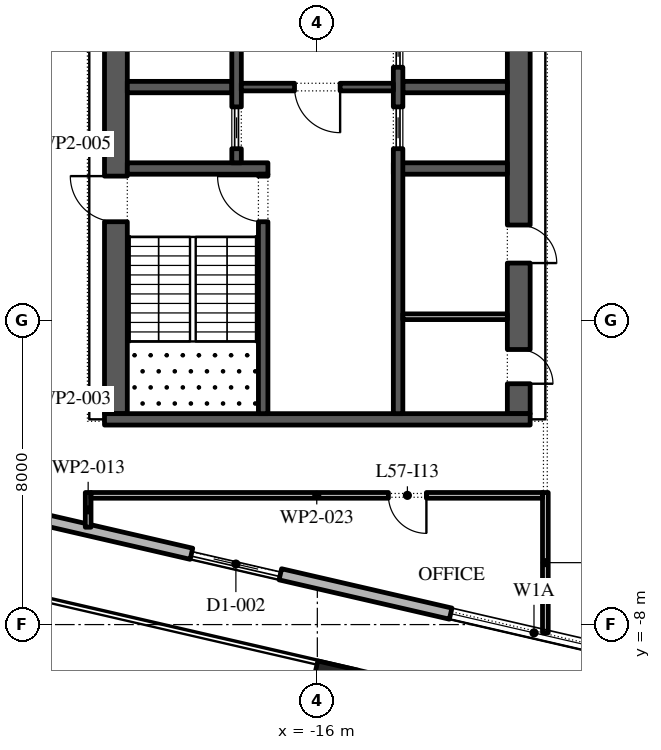
"""IFC4 building model, lengths in metres.
Left out: names, types, materials, properties, quantities, classifications, styles, units other than length and angle.
Written with IfcOpenShell. Run it as: python <this file> out.ifc"""

import sys

from ifc_helpers import new_model, si_unit, direction, frame, frame_2d, origin, origin_2d, place, context, subcontext, project, spatial, rectangle, extrude, element, fill, save


model = new_model("IFC4")
c1 = context("Model", 3, precision=1e-05, world=origin(), true_north=direction((0.0, 1.0)))
c2 = subcontext(c1, "Body", "Model", "MODEL_VIEW")
j1 = project(units=[si_unit("LENGTHUNIT", "METRE"), si_unit("PLANEANGLEUNIT", "RADIAN")], contexts=[c1])
p1 = place(None, origin())
s1 = spatial("IfcSite", under=j1, at=p1, CompositionType="ELEMENT")
p2 = place(p1, origin())
s2 = spatial("IfcBuilding", under=s1, at=p2, CompositionType="ELEMENT")
p3 = place(p2, frame((0.0, 0.0, 264.0)))
s3 = spatial("IfcBuildingStorey", under=s2, at=p3, CompositionType="ELEMENT", Elevation=264.0)
p4 = place(p3, frame((-15.574, -9.617, 0.0), z_axis=(0.0, 0.0, 1.0), x_axis=(0.974370064785, -0.224951054344, 0.0)))
e1 = element("IfcColumn", 1, at=p4, inside=s3, PredefinedType="COLUMN", context=c2, shape_type="SweptSolid", body=[
    extrude(rectangle(XDim=1.1, YDim=1.1, at=origin_2d()), origin(), (0.0, 0.0, 1.0), 4.2),
])
p5 = place(p3, frame((-29.616, -3.758, 0.0), z_axis=(0.0, 0.0, 1.0), x_axis=(0.974370532314, -0.224949029246, 0.0)))
e2 = element("IfcWall", 2, at=p5, inside=s3, PredefinedType="STANDARD", context=c2, shape_type="SweptSolid", body=[
    extrude(rectangle(XDim=48.0, YDim=0.3, at=frame_2d((24.0, 0.0))), origin(), (0.0, 0.0, 1.0), 4.0),
])
p6 = place(p5, frame((1.625, 0.0, 0.45)))
e3 = element("IfcOpeningElement", 3, at=p6, cuts=e2, PredefinedType="OPENING", context=c2, shape_type="SweptSolid", body=[
    extrude(rectangle(XDim=4.5, YDim=3.05, at=frame_2d((2.25, 1.525))), frame((0.0, 0.16, 0.0), z_axis=(0.0, -1.0, 0.0), x_axis=(1.0, 0.0, 0.0)), (0.0, 0.0, 1.0), 0.32),
])
p7 = place(p5, frame((10.575, 0.0, 0.0)))
e4 = element("IfcOpeningElement", 4, at=p7, cuts=e2, PredefinedType="OPENING", context=c2, shape_type="SweptSolid", body=[
    extrude(rectangle(XDim=2.4, YDim=3.5, at=frame_2d((1.2, 1.75))), frame((0.0, 0.16, 0.0), z_axis=(0.0, -1.0, 0.0), x_axis=(1.0, 0.0, 0.0)), (0.0, 0.0, 1.0), 0.32),
])
p8 = place(p5, frame((17.575, 0.0, 0.45)))
e5 = element("IfcOpeningElement", 5, at=p8, cuts=e2, PredefinedType="OPENING", context=c2, shape_type="SweptSolid", body=[
    extrude(rectangle(XDim=4.5, YDim=3.0, at=frame_2d((2.25, 1.5))), frame((0.0, 0.16, 0.0), z_axis=(0.0, -1.0, 0.0), x_axis=(1.0, 0.0, 0.0)), (0.0, 0.0, 1.0), 0.32),
])
p9 = place(p5, frame((25.625, 0.0, 0.45)))
e6 = element("IfcOpeningElement", 6, at=p9, cuts=e2, PredefinedType="OPENING", context=c2, shape_type="SweptSolid", body=[
    extrude(rectangle(XDim=4.5, YDim=2.95, at=frame_2d((2.25, 1.475))), frame((0.0, 0.16, 0.0), z_axis=(0.0, -1.0, 0.0), x_axis=(1.0, 0.0, 0.0)), (0.0, 0.0, 1.0), 0.32),
])
p10 = place(p5, frame((33.675, 0.0, 0.45)))
e7 = element("IfcOpeningElement", 7, at=p10, cuts=e2, PredefinedType="OPENING", context=c2, shape_type="SweptSolid", body=[
    extrude(rectangle(XDim=4.5, YDim=2.825, at=frame_2d((2.25, 1.413))), frame((0.0, 0.16, 0.0), z_axis=(0.0, -1.0, 0.0), x_axis=(1.0, 0.0, 0.0)), (0.0, 0.0, 1.0), 0.32),
])
p11 = place(p5, frame((42.775, 0.0, 0.0)))
e8 = element("IfcOpeningElement", 8, at=p11, cuts=e2, PredefinedType="OPENING", context=c2, shape_type="SweptSolid", body=[
    extrude(rectangle(XDim=2.4, YDim=3.5, at=frame_2d((1.2, 1.75))), frame((0.0, 0.16, 0.0), z_axis=(0.0, -1.0, 0.0), x_axis=(1.0, 0.0, 0.0)), (0.0, 0.0, 1.0), 0.32),
])
p12 = place(p3, frame((-21.359, 48.678, 0.0), z_axis=(0.0, 0.0, 1.0), x_axis=(-0.224949198343, -0.974370493275, 0.0)))
e9 = element("IfcWall", 9, at=p12, inside=s3, PredefinedType="STANDARD", context=c2, shape_type="SweptSolid", body=[
    extrude(rectangle(XDim=49.5, YDim=0.3, at=frame_2d((24.75, 0.0))), origin(), (0.0, 0.0, 1.0), 4.0),
])
p13 = place(p12, frame((1.157, 0.0, 0.45)))
e10 = element("IfcOpeningElement", 10, at=p13, cuts=e9, PredefinedType="OPENING", context=c2, shape_type="SweptSolid", body=[
    extrude(rectangle(XDim=4.5, YDim=3.05, at=frame_2d((2.25, 1.525))), frame((0.0, 0.16, 0.0), z_axis=(0.0, -1.0, 0.0), x_axis=(1.0, 0.0, 0.0)), (0.0, 0.0, 1.0), 0.32),
])
p14 = place(p12, frame((9.171, 0.0, 0.0)))
e11 = element("IfcOpeningElement", 11, at=p14, cuts=e9, PredefinedType="OPENING", context=c2, shape_type="SweptSolid", body=[
    extrude(rectangle(XDim=2.4, YDim=3.5, at=frame_2d((1.2, 1.75))), frame((0.0, 0.16, 0.0), z_axis=(0.0, -1.0, 0.0), x_axis=(1.0, 0.0, 0.0)), (0.0, 0.0, 1.0), 0.32),
])
p15 = place(p12, frame((15.236, 0.0, 0.45)))
e12 = element("IfcOpeningElement", 12, at=p15, cuts=e9, PredefinedType="OPENING", context=c2, shape_type="SweptSolid", body=[
    extrude(rectangle(XDim=4.5, YDim=3.05, at=frame_2d((2.25, 1.525))), frame((0.0, 0.16, 0.0), z_axis=(0.0, -1.0, 0.0), x_axis=(1.0, 0.0, 0.0)), (0.0, 0.0, 1.0), 0.32),
])
p16 = place(p12, frame((22.35, 0.0, 0.45)))
e13 = element("IfcOpeningElement", 13, at=p16, cuts=e9, PredefinedType="OPENING", context=c2, shape_type="SweptSolid", body=[
    extrude(rectangle(XDim=4.5, YDim=3.05, at=frame_2d((2.25, 1.525))), frame((0.0, 0.16, 0.0), z_axis=(0.0, -1.0, 0.0), x_axis=(1.0, 0.0, 0.0)), (0.0, 0.0, 1.0), 0.32),
])
p17 = place(p12, frame((29.464, 0.0, 0.45)))
e14 = element("IfcOpeningElement", 14, at=p17, cuts=e9, PredefinedType="OPENING", context=c2, shape_type="SweptSolid", body=[
    extrude(rectangle(XDim=4.5, YDim=3.05, at=frame_2d((2.25, 1.525))), frame((0.0, 0.16, 0.0), z_axis=(0.0, -1.0, 0.0), x_axis=(1.0, 0.0, 0.0)), (0.0, 0.0, 1.0), 0.32),
])
p18 = place(p12, frame((37.628, 0.0, 0.0)))
e15 = element("IfcOpeningElement", 15, at=p18, cuts=e9, PredefinedType="OPENING", context=c2, shape_type="SweptSolid", body=[
    extrude(rectangle(XDim=2.4, YDim=3.325, at=frame_2d((1.2, 1.663))), frame((0.0, 0.16, 0.0), z_axis=(0.0, -1.0, 0.0), x_axis=(1.0, 0.0, 0.0)), (0.0, 0.0, 1.0), 0.32),
])
p19 = place(p12, frame((43.693, 0.0, 0.45)))
e16 = element("IfcOpeningElement", 16, at=p19, cuts=e9, PredefinedType="OPENING", context=c2, shape_type="SweptSolid", body=[
    extrude(rectangle(XDim=4.5, YDim=2.825, at=frame_2d((2.25, 1.413))), frame((0.0, 0.16, 0.0), z_axis=(0.0, -1.0, 0.0), x_axis=(1.0, 0.0, 0.0)), (0.0, 0.0, 1.0), 0.32),
])
p20 = place(p3, frame((-21.3, -2.45, 0.0), z_axis=(0.0, 0.0, 1.0), x_axis=(0.0, 1.0, 0.0)))
e17 = element("IfcWall", 17, at=p20, inside=s3, PredefinedType="SHEAR", context=c2, shape_type="SweptSolid", body=[
    extrude(rectangle(XDim=27.9, YDim=0.6, at=frame_2d((13.95, 0.0))), origin(), (0.0, 0.0, 1.0), 4.0),
])
p21 = place(p20, frame((5.05, 0.0, 0.0)))
e18 = element("IfcOpeningElement", 18, at=p21, cuts=e17, PredefinedType="OPENING", context=c2, shape_type="SweptSolid", body=[
    extrude(rectangle(XDim=1.2, YDim=2.1, at=frame_2d((0.6, 1.05))), frame((0.0, 0.31, 0.0), z_axis=(0.0, -1.0, 0.0), x_axis=(1.0, 0.0, 0.0)), (0.0, 0.0, 1.0), 0.62),
])
p22 = place(p20, frame((21.65, 0.0, 0.0)))
e19 = element("IfcOpeningElement", 19, at=p22, cuts=e17, PredefinedType="OPENING", context=c2, shape_type="SweptSolid", body=[
    extrude(rectangle(XDim=1.2, YDim=2.1, at=frame_2d((0.6, 1.05))), frame((0.0, 0.31, 0.0), z_axis=(0.0, -1.0, 0.0), x_axis=(1.0, 0.0, 0.0)), (0.0, 0.0, 1.0), 0.62),
])
p23 = place(p3, frame((-10.7, -2.45, 0.0), z_axis=(0.0, 0.0, 1.0), x_axis=(0.0, 1.0, 0.0)))
e20 = element("IfcWall", 20, at=p23, inside=s3, PredefinedType="SHEAR", context=c2, shape_type="SweptSolid", body=[
    extrude(rectangle(XDim=27.9, YDim=0.6, at=frame_2d((13.95, 0.0))), origin(), (0.0, 0.0, 1.0), 4.0),
])
p24 = place(p23, frame((23.65, 0.0, 0.0)))
e21 = element("IfcOpeningElement", 21, at=p24, cuts=e20, PredefinedType="OPENING", context=c2, shape_type="SweptSolid", body=[
    extrude(rectangle(XDim=2.4, YDim=2.1, at=frame_2d((1.2, 1.05))), frame((0.0, 0.31, 0.0), z_axis=(0.0, -1.0, 0.0), x_axis=(1.0, 0.0, 0.0)), (0.0, 0.0, 1.0), 0.62),
])
p25 = place(p23, frame((0.788, 0.0, 0.0)))
e22 = element("IfcOpeningElement", 22, at=p25, cuts=e20, PredefinedType="OPENING", context=c2, shape_type="SweptSolid", body=[
    extrude(rectangle(XDim=0.9, YDim=2.1, at=frame_2d((0.45, 1.05))), frame((0.0, 0.31, 0.0), z_axis=(0.0, -1.0, 0.0), x_axis=(1.0, 0.0, 0.0)), (0.0, 0.0, 1.0), 0.62),
])
p26 = place(p23, frame((3.962, 0.0, 0.0)))
e23 = element("IfcOpeningElement", 23, at=p26, cuts=e20, PredefinedType="OPENING", context=c2, shape_type="SweptSolid", body=[
    extrude(rectangle(XDim=1.0, YDim=2.1, at=frame_2d((0.5, 1.05))), frame((0.0, 0.31, 0.0), z_axis=(0.0, -1.0, 0.0), x_axis=(1.0, 0.0, 0.0)), (0.0, 0.0, 1.0), 0.62),
])
p27 = place(p3, frame((-21.6, -2.6, 0.0), z_axis=(0.0, 0.0, 1.0), x_axis=(1.0, 0.0, 0.0)))
e24 = element("IfcWall", 24, at=p27, inside=s3, PredefinedType="SHEAR", context=c2, shape_type="SweptSolid", body=[
    extrude(rectangle(XDim=11.2, YDim=0.3, at=frame_2d((5.6, 0.0))), origin(), (0.0, 0.0, 1.0), 4.0),
])
p28 = place(p3, frame((-21.0, 4.0, 0.0), z_axis=(0.0, 0.0, 1.0), x_axis=(1.0, 0.0, 0.0)))
e25 = element("IfcWall", 25, at=p28, inside=s3, PredefinedType="SHEAR", context=c2, shape_type="SweptSolid", body=[
    extrude(rectangle(XDim=3.7, YDim=0.3, at=frame_2d((1.85, 0.0))), origin(), (0.0, 0.0, 1.0), 4.0),
])
p29 = place(p3, frame((-17.425, -2.45, 0.0), z_axis=(0.0, 0.0, 1.0), x_axis=(0.0, 1.0, 0.0)))
e26 = element("IfcWall", 26, at=p29, inside=s3, PredefinedType="SHEAR", context=c2, shape_type="SweptSolid", body=[
    extrude(rectangle(XDim=6.3, YDim=0.25, at=frame_2d((3.15, 0.0))), origin(), (0.0, 0.0, 1.0), 4.0),
])
p30 = place(p29, frame((5.05, 0.0, 0.0)))
e27 = element("IfcOpeningElement", 27, at=p30, cuts=e26, PredefinedType="OPENING", context=c2, shape_type="SweptSolid", body=[
    extrude(rectangle(XDim=1.2, YDim=2.1, at=frame_2d((0.6, 1.05))), frame((0.0, 0.135, 0.0), z_axis=(0.0, -1.0, 0.0), x_axis=(1.0, 0.0, 0.0)), (0.0, 0.0, 1.0), 0.27),
])
p31 = place(p3, frame((-21.0, 6.143, 0.0), z_axis=(0.0, 0.0, 1.0), x_axis=(1.0, 0.0, 0.0)))
e28 = element("IfcWall", 28, at=p31, inside=s3, PredefinedType="SHEAR", context=c2, shape_type="SweptSolid", body=[
    extrude(rectangle(XDim=2.75, YDim=0.3, at=frame_2d((1.375, 0.0))), origin(), (0.0, 0.0, 1.0), 4.0),
])
p32 = place(p3, frame((-18.125, 4.15, 0.0), z_axis=(0.0, 0.0, 1.0), x_axis=(0.0, 1.0, 0.0)))
e29 = element("IfcWall", 29, at=p32, inside=s3, PredefinedType="SHEAR", context=c2, shape_type="SweptSolid", body=[
    extrude(rectangle(XDim=14.7, YDim=0.25, at=frame_2d((7.35, 0.0))), origin(), (0.0, 0.0, 1.0), 4.0),
])
p33 = place(p32, frame((4.296, 0.0, 0.0)))
e30 = element("IfcOpeningElement", 30, at=p33, cuts=e29, PredefinedType="OPENING", context=c2, shape_type="SweptSolid", body=[
    extrude(rectangle(XDim=0.9, YDim=2.1, at=frame_2d((0.45, 1.05))), frame((0.0, 0.135, 0.0), z_axis=(0.0, -1.0, 0.0), x_axis=(1.0, 0.0, 0.0)), (0.0, 0.0, 1.0), 0.27),
])
p34 = place(p32, frame((9.504, 0.0, 0.0)))
e31 = element("IfcOpeningElement", 31, at=p34, cuts=e29, PredefinedType="OPENING", context=c2, shape_type="SweptSolid", body=[
    extrude(rectangle(XDim=0.9, YDim=2.1, at=frame_2d((0.45, 1.05))), frame((0.0, 0.135, 0.0), z_axis=(0.0, -1.0, 0.0), x_axis=(1.0, 0.0, 0.0)), (0.0, 0.0, 1.0), 0.27),
])
p35 = place(p32, frame((0.371, 0.0, 0.0)))
e32 = element("IfcOpeningElement", 32, at=p35, cuts=e29, PredefinedType="OPENING", context=c2, shape_type="SweptSolid", body=[
    extrude(rectangle(XDim=1.1, YDim=2.1, at=frame_2d((0.55, 1.05))), frame((0.0, 0.135, 0.0), z_axis=(0.0, -1.0, 0.0), x_axis=(1.0, 0.0, 0.0)), (0.0, 0.0, 1.0), 0.27),
])
p36 = place(p32, frame((13.229, 0.0, 0.0)))
e33 = element("IfcOpeningElement", 33, at=p36, cuts=e29, PredefinedType="OPENING", context=c2, shape_type="SweptSolid", body=[
    extrude(rectangle(XDim=1.1, YDim=2.1, at=frame_2d((0.55, 1.05))), frame((0.0, 0.135, 0.0), z_axis=(0.0, -1.0, 0.0), x_axis=(1.0, 0.0, 0.0)), (0.0, 0.0, 1.0), 0.27),
])
p37 = place(p3, frame((-14.0, 4.0, 0.0), z_axis=(0.0, 0.0, 1.0), x_axis=(1.0, 0.0, 0.0)))
e34 = element("IfcWall", 34, at=p37, inside=s3, PredefinedType="SHEAR", context=c2, shape_type="SweptSolid", body=[
    extrude(rectangle(XDim=3.0, YDim=0.3, at=frame_2d((1.5, 0.0))), origin(), (0.0, 0.0, 1.0), 4.0),
])
p38 = place(p3, frame((-13.75, 6.143, 0.0), z_axis=(0.0, 0.0, 1.0), x_axis=(1.0, 0.0, 0.0)))
e35 = element("IfcWall", 35, at=p38, inside=s3, PredefinedType="SHEAR", context=c2, shape_type="SweptSolid", body=[
    extrude(rectangle(XDim=2.75, YDim=0.3, at=frame_2d((1.375, 0.0))), origin(), (0.0, 0.0, 1.0), 4.0),
])
p39 = place(p3, frame((-13.875, -2.45, 0.0), z_axis=(0.0, 0.0, 1.0), x_axis=(0.0, 1.0, 0.0)))
e36 = element("IfcWall", 36, at=p39, inside=s3, PredefinedType="SHEAR", context=c2, shape_type="SweptSolid", body=[
    extrude(rectangle(XDim=21.3, YDim=0.25, at=frame_2d((10.65, 0.0))), origin(), (0.0, 0.0, 1.0), 4.0),
])
p40 = place(p39, frame((17.786, 0.0, 0.0)))
e37 = element("IfcOpeningElement", 37, at=p40, cuts=e36, PredefinedType="OPENING", context=c2, shape_type="SweptSolid", body=[
    extrude(rectangle(XDim=0.9, YDim=2.1, at=frame_2d((0.45, 1.05))), frame((0.0, 0.135, 0.0), z_axis=(0.0, -1.0, 0.0), x_axis=(1.0, 0.0, 0.0)), (0.0, 0.0, 1.0), 0.27),
])
p41 = place(p39, frame((6.971, 0.0, 0.0)))
e38 = element("IfcOpeningElement", 38, at=p41, cuts=e36, PredefinedType="OPENING", context=c2, shape_type="SweptSolid", body=[
    extrude(rectangle(XDim=1.1, YDim=2.1, at=frame_2d((0.55, 1.05))), frame((0.0, 0.135, 0.0), z_axis=(0.0, -1.0, 0.0), x_axis=(1.0, 0.0, 0.0)), (0.0, 0.0, 1.0), 0.27),
])
p42 = place(p39, frame((9.114, 0.0, 0.0)))
e39 = element("IfcOpeningElement", 39, at=p42, cuts=e36, PredefinedType="OPENING", context=c2, shape_type="SweptSolid", body=[
    extrude(rectangle(XDim=1.1, YDim=2.1, at=frame_2d((0.55, 1.05))), frame((0.0, 0.135, 0.0), z_axis=(0.0, -1.0, 0.0), x_axis=(1.0, 0.0, 0.0)), (0.0, 0.0, 1.0), 0.27),
])
p43 = place(p39, frame((11.257, 0.0, 0.0)))
e40 = element("IfcOpeningElement", 40, at=p43, cuts=e36, PredefinedType="OPENING", context=c2, shape_type="SweptSolid", body=[
    extrude(rectangle(XDim=1.1, YDim=2.1, at=frame_2d((0.55, 1.05))), frame((0.0, 0.135, 0.0), z_axis=(0.0, -1.0, 0.0), x_axis=(1.0, 0.0, 0.0)), (0.0, 0.0, 1.0), 0.27),
])
p44 = place(p39, frame((13.4, 0.0, 0.0)))
e41 = element("IfcOpeningElement", 41, at=p44, cuts=e36, PredefinedType="OPENING", context=c2, shape_type="SweptSolid", body=[
    extrude(rectangle(XDim=1.1, YDim=2.1, at=frame_2d((0.55, 1.05))), frame((0.0, 0.135, 0.0), z_axis=(0.0, -1.0, 0.0), x_axis=(1.0, 0.0, 0.0)), (0.0, 0.0, 1.0), 0.27),
])
p45 = place(p3, frame((-18.0, 6.143, 0.0), z_axis=(0.0, 0.0, 1.0), x_axis=(1.0, 0.0, 0.0)))
e42 = element("IfcWall", 42, at=p45, inside=s3, PredefinedType="SHEAR", context=c2, shape_type="SweptSolid", body=[
    extrude(rectangle(XDim=4.0, YDim=0.2, at=frame_2d((2.0, 0.0))), origin(), (0.0, 0.0, 1.0), 4.0),
])
p46 = place(p45, frame((1.4, 0.0, 0.0)))
e43 = element("IfcOpeningElement", 43, at=p46, cuts=e42, PredefinedType="OPENING", context=c2, shape_type="SweptSolid", body=[
    extrude(rectangle(XDim=1.2, YDim=2.1, at=frame_2d((0.6, 1.05))), frame((0.0, 0.11, 0.0), z_axis=(0.0, -1.0, 0.0), x_axis=(1.0, 0.0, 0.0)), (0.0, 0.0, 1.0), 0.22),
])
p47 = place(p3, frame((-13.75, 0.1, 0.0), z_axis=(0.0, 0.0, 1.0), x_axis=(1.0, 0.0, 0.0)))
e44 = element("IfcWall", 44, at=p47, inside=s3, PredefinedType="PARTITIONING", context=c2, shape_type="SweptSolid", body=[
    extrude(rectangle(XDim=2.75, YDim=0.15, at=frame_2d((1.375, 0.0))), origin(), (0.0, 0.0, 1.0), 4.0),
])
p48 = place(p3, frame((-22.03, -4.525, 0.0), z_axis=(0.0, 0.0, 1.0), x_axis=(0.0, -1.0, 0.0)))
e45 = element("IfcWall", 45, at=p48, inside=s3, PredefinedType="PARTITIONING", context=c2, shape_type="SweptSolid", body=[
    extrude(rectangle(XDim=0.913, YDim=0.15, at=frame_2d((0.457, 0.0))), origin(), (0.0, 0.0, 1.0), 4.0),
])
p49 = place(p3, frame((-10.0, -8.216, 0.0), z_axis=(0.0, 0.0, 1.0), x_axis=(0.0, 1.0, 0.0)))
e46 = element("IfcWall", 46, at=p49, inside=s3, PredefinedType="PARTITIONING", context=c2, shape_type="SweptSolid", body=[
    extrude(rectangle(XDim=3.691, YDim=0.15, at=frame_2d((1.846, 0.0))), origin(), (0.0, 0.0, 1.0), 4.0),
])
p50 = place(p3, frame((-10.075, -4.6, 0.0), z_axis=(0.0, 0.0, 1.0), x_axis=(-1.0, 0.0, 0.0)))
e47 = element("IfcWall", 47, at=p50, inside=s3, PredefinedType="PARTITIONING", context=c2, shape_type="SweptSolid", body=[
    extrude(rectangle(XDim=11.88, YDim=0.15, at=frame_2d((5.94, 0.0))), origin(), (0.0, 0.0, 1.0), 4.0),
])
p51 = place(p50, frame((3.055, 0.0, 0.0)))
e48 = element("IfcOpeningElement", 48, at=p51, cuts=e47, PredefinedType="OPENING", context=c2, shape_type="SweptSolid", body=[
    extrude(rectangle(XDim=1.0, YDim=2.1, at=frame_2d((0.5, 1.05))), frame((0.0, 0.085, 0.0), z_axis=(0.0, -1.0, 0.0), x_axis=(1.0, 0.0, 0.0)), (0.0, 0.0, 1.0), 0.17),
])
p52 = place(p7, origin())
e49 = element("IfcDoor", 49, at=p52, inside=s3, OperationType="DOUBLE_DOOR_SLIDING", PredefinedType="DOOR", context=c2, shape_type="SweptSolid", body=[
    extrude(rectangle(XDim=2.4, YDim=3.5, at=frame_2d((1.2, 1.75))), frame((0.0, 0.025, 0.0), z_axis=(0.0, -1.0, 0.0), x_axis=(1.0, 0.0, 0.0)), (0.0, 0.0, 1.0), 0.05),
])
fill(e4, e49)
p53 = place(p8, origin())
e50 = element("IfcWindow", 50, at=p53, inside=s3, PartitioningType="DOUBLE_PANEL_VERTICAL", PredefinedType="WINDOW", context=c2, shape_type="SweptSolid", body=[
    extrude(rectangle(XDim=4.5, YDim=3.0, at=frame_2d((2.25, 1.5))), frame((0.0, 0.03, 0.0), z_axis=(0.0, -1.0, 0.0), x_axis=(1.0, 0.0, 0.0)), (0.0, 0.0, 1.0), 0.06),
])
fill(e5, e50)
p54 = place(p35, origin())
e51 = element("IfcDoor", 51, at=p54, inside=s3, OperationType="SLIDING_TO_LEFT", PredefinedType="DOOR", context=c2, shape_type="SweptSolid", body=[
    extrude(rectangle(XDim=1.1, YDim=2.1, at=frame_2d((0.55, 1.05))), frame((0.0, 0.025, 0.0), z_axis=(0.0, -1.0, 0.0), x_axis=(1.0, 0.0, 0.0)), (0.0, 0.0, 1.0), 0.05),
])
fill(e32, e51)
p55 = place(p41, origin())
e52 = element("IfcDoor", 52, at=p55, inside=s3, OperationType="SLIDING_TO_LEFT", PredefinedType="DOOR", context=c2, shape_type="SweptSolid", body=[
    extrude(rectangle(XDim=1.1, YDim=2.1, at=frame_2d((0.55, 1.05))), frame((0.0, 0.025, 0.0), z_axis=(0.0, -1.0, 0.0), x_axis=(1.0, 0.0, 0.0)), (0.0, 0.0, 1.0), 0.05),
])
fill(e38, e52)
p56 = place(p42, origin())
e53 = element("IfcDoor", 53, at=p56, inside=s3, OperationType="SLIDING_TO_LEFT", PredefinedType="DOOR", context=c2, shape_type="SweptSolid", body=[
    extrude(rectangle(XDim=1.1, YDim=2.1, at=frame_2d((0.55, 1.05))), frame((0.0, 0.025, 0.0), z_axis=(0.0, -1.0, 0.0), x_axis=(1.0, 0.0, 0.0)), (0.0, 0.0, 1.0), 0.05),
])
fill(e39, e53)
p57 = place(p46, frame((1.2, 0.0, 0.0), z_axis=(0.0, 0.0, 1.0), x_axis=(-1.0, 0.0, 0.0)))
e54 = element("IfcDoor", 54, at=p57, inside=s3, OperationType="SINGLE_SWING_RIGHT", PredefinedType="DOOR", context=c2, shape_type="SweptSolid", body=[
    extrude(rectangle(XDim=1.2, YDim=2.1, at=frame_2d((0.6, 1.05))), frame((0.0, 0.025, 0.0), z_axis=(0.0, -1.0, 0.0), x_axis=(1.0, 0.0, 0.0)), (0.0, 0.0, 1.0), 0.05),
])
fill(e43, e54)
p58 = place(p30, origin())
e55 = element("IfcDoor", 55, at=p58, inside=s3, OperationType="SINGLE_SWING_LEFT", PredefinedType="DOOR", context=c2, shape_type="SweptSolid", body=[
    extrude(rectangle(XDim=1.2, YDim=2.1, at=frame_2d((0.6, 1.05))), frame((0.0, 0.025, 0.0), z_axis=(0.0, -1.0, 0.0), x_axis=(1.0, 0.0, 0.0)), (0.0, 0.0, 1.0), 0.05),
])
fill(e27, e55)
p59 = place(p21, origin())
e56 = element("IfcDoor", 56, at=p59, inside=s3, OperationType="SINGLE_SWING_LEFT", PredefinedType="DOOR", context=c2, shape_type="SweptSolid", body=[
    extrude(rectangle(XDim=1.2, YDim=2.1, at=frame_2d((0.6, 1.05))), frame((0.0, 0.025, 0.0), z_axis=(0.0, -1.0, 0.0), x_axis=(1.0, 0.0, 0.0)), (0.0, 0.0, 1.0), 0.05),
])
fill(e18, e56)
p60 = place(p25, frame((0.9, 0.55, 0.0), z_axis=(0.0, 0.0, 1.0), x_axis=(-1.0, 0.0, 0.0)))
e57 = element("IfcDoor", 57, at=p60, inside=s3, OperationType="SINGLE_SWING_LEFT", PredefinedType="DOOR", context=c2, shape_type="SweptSolid", body=[
    extrude(rectangle(XDim=0.9, YDim=2.1, at=frame_2d((0.45, 1.05))), frame((0.0, 0.3, 0.0), z_axis=(0.0, -1.0, 0.0), x_axis=(1.0, 0.0, 0.0)), (0.0, 0.0, 1.0), 0.05),
])
fill(e22, e57)
p61 = place(p26, frame((1.0, 0.55, 0.0), z_axis=(0.0, 0.0, 1.0), x_axis=(-1.0, 0.0, 0.0)))
e58 = element("IfcDoor", 58, at=p61, inside=s3, OperationType="SINGLE_SWING_LEFT", PredefinedType="DOOR", context=c2, shape_type="SweptSolid", body=[
    extrude(rectangle(XDim=1.0, YDim=2.1, at=frame_2d((0.5, 1.05))), frame((0.0, 0.3, 0.0), z_axis=(0.0, -1.0, 0.0), x_axis=(1.0, 0.0, 0.0)), (0.0, 0.0, 1.0), 0.05),
])
fill(e23, e58)
p62 = place(p51, origin())
e59 = element("IfcDoor", 59, at=p62, inside=s3, OperationType="SINGLE_SWING_RIGHT", PredefinedType="DOOR", context=c2, shape_type="SweptSolid", body=[
    extrude(rectangle(XDim=1.0, YDim=2.1, at=frame_2d((0.5, 1.05))), frame((0.0, 0.025, 0.0), z_axis=(0.0, -1.0, 0.0), x_axis=(1.0, 0.0, 0.0)), (0.0, 0.0, 1.0), 0.05),
])
fill(e48, e59)
save(model, sys.argv[1])
